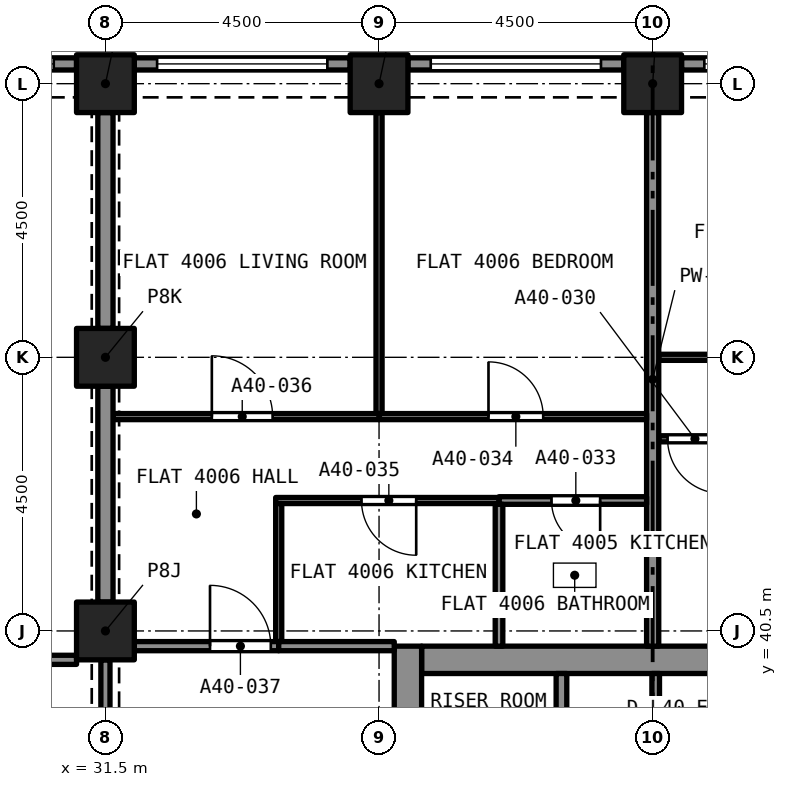
"""IFC4 building model, lengths in metres.
Left out: names, types, materials, properties, quantities, classifications, styles, units other than length and angle.
Written with IfcOpenShell. Run it as: python <this file> out.ifc"""

import sys

from ifc_helpers import new_model, si_unit, direction, frame, frame_2d, origin, origin_2d, place, context, subcontext, project, spatial, rectangle, extrude, element, fill, save


model = new_model("IFC4")
c1 = context("Model", 3, precision=1e-05, world=origin(), true_north=direction((0.0, 1.0)))
c2 = subcontext(c1, "Body", "Model", "MODEL_VIEW")
j1 = project(units=[si_unit("LENGTHUNIT", "METRE"), si_unit("PLANEANGLEUNIT", "RADIAN")], contexts=[c1])
p1 = place(None, origin())
s1 = spatial("IfcSite", under=j1, at=p1, CompositionType="ELEMENT")
p2 = place(p1, origin())
s2 = spatial("IfcBuilding", under=s1, at=p2, CompositionType="ELEMENT")
p3 = place(p2, frame((0.0, 0.0, 143.0)))
s3 = spatial("IfcBuildingStorey", under=s2, at=p3, CompositionType="ELEMENT", Elevation=143.0)
for number, where, z_axis, x_axis in (
    (1, (31.5, 40.5, 0.0), (0.0, 0.0, 1.0), (1.0, 0.0, 0.0)),
    (2, (31.5, 45.0, 0.0), (0.0, 0.0, 1.0), (1.0, 0.0, 0.0)),
    (3, (31.5, 49.5, 0.0), (0.0, 0.0, 1.0), (1.0, 0.0, 0.0)),
    (4, (36.0, 49.5, 0.0), (0.0, 0.0, 1.0), (1.0, 0.0, 0.0)),
    (5, (40.5, 49.5, 0.0), (0.0, 0.0, 1.0), (1.0, 0.0, 0.0)),
):
    element("IfcColumn", number, at=place(p3, frame(where, z_axis=z_axis, x_axis=x_axis)), inside=s3, PredefinedType="COLUMN", context=c2, shape_type="SweptSolid", body=[
        extrude(rectangle(XDim=0.95, YDim=0.95, at=origin_2d()), origin(), (0.0, 0.0, 1.0), 3.2),
    ])
p4 = place(p3, frame((36.7, 40.025, 0.0), z_axis=(0.0, 0.0, 1.0), x_axis=(1.0, 0.0, 0.0)))
e6 = element("IfcWall", 6, at=p4, inside=s3, PredefinedType="SOLIDWALL", context=c2, shape_type="SweptSolid", body=[
    extrude(rectangle(XDim=7.6, YDim=0.45, at=frame_2d((3.8, 0.0))), origin(), (0.0, 0.0, 1.0), 3.2),
])
p5 = place(p3, frame((36.475, 27.25, 0.0), z_axis=(0.0, 0.0, 1.0), x_axis=(0.0, 1.0, 0.0)))
e7 = element("IfcWall", 7, at=p5, inside=s3, PredefinedType="SOLIDWALL", context=c2, shape_type="SweptSolid", body=[
    extrude(rectangle(XDim=13.0, YDim=0.45, at=frame_2d((6.5, 0.0))), origin(), (0.0, 0.0, 1.0), 3.2),
])
p6 = place(p5, frame((8.7, 0.0, 0.0)))
e8 = element("IfcOpeningElement", 8, at=p6, cuts=e7, PredefinedType="OPENING", context=c2, shape_type="SweptSolid", body=[
    extrude(rectangle(XDim=1.2, YDim=2.1, at=frame_2d((0.6, 1.05))), frame((0.0, 0.235, 0.0), z_axis=(0.0, -1.0, 0.0), x_axis=(1.0, 0.0, 0.0)), (0.0, 0.0, 1.0), 0.47),
])
p7 = place(p3, frame((40.975, 49.825, 0.0), z_axis=(0.0, 0.0, 1.0), x_axis=(1.0, 0.0, 0.0)))
e9 = element("IfcWall", 9, at=p7, inside=s3, PredefinedType="SOLIDWALL", context=c2, shape_type="SweptSolid", body=[
    extrude(rectangle(XDim=3.55, YDim=0.2, at=frame_2d((1.775, 0.0))), origin(), (0.0, 0.0, 1.0), 3.2),
])
p8 = place(p7, frame((0.375, 0.0, 0.45)))
e10 = element("IfcOpeningElement", 10, at=p8, cuts=e9, PredefinedType="OPENING", context=c2, shape_type="SweptSolid", body=[
    extrude(rectangle(XDim=2.8, YDim=1.95, at=frame_2d((1.4, 0.975))), frame((0.0, 0.11, 0.0), z_axis=(0.0, -1.0, 0.0), x_axis=(1.0, 0.0, 0.0)), (0.0, 0.0, 1.0), 0.22),
])
p9 = place(p3, frame((36.475, 49.825, 0.0), z_axis=(0.0, 0.0, 1.0), x_axis=(1.0, 0.0, 0.0)))
e11 = element("IfcWall", 11, at=p9, inside=s3, PredefinedType="SOLIDWALL", context=c2, shape_type="SweptSolid", body=[
    extrude(rectangle(XDim=3.55, YDim=0.2, at=frame_2d((1.775, 0.0))), origin(), (0.0, 0.0, 1.0), 3.2),
])
p10 = place(p9, frame((0.375, 0.0, 0.45)))
e12 = element("IfcOpeningElement", 12, at=p10, cuts=e11, PredefinedType="OPENING", context=c2, shape_type="SweptSolid", body=[
    extrude(rectangle(XDim=2.8, YDim=1.95, at=frame_2d((1.4, 0.975))), frame((0.0, 0.11, 0.0), z_axis=(0.0, -1.0, 0.0), x_axis=(1.0, 0.0, 0.0)), (0.0, 0.0, 1.0), 0.22),
])
p11 = place(p3, frame((31.975, 49.825, 0.0), z_axis=(0.0, 0.0, 1.0), x_axis=(1.0, 0.0, 0.0)))
e13 = element("IfcWall", 13, at=p11, inside=s3, PredefinedType="SOLIDWALL", context=c2, shape_type="SweptSolid", body=[
    extrude(rectangle(XDim=3.55, YDim=0.2, at=frame_2d((1.775, 0.0))), origin(), (0.0, 0.0, 1.0), 3.2),
])
p12 = place(p11, frame((0.375, 0.0, 0.45)))
e14 = element("IfcOpeningElement", 14, at=p12, cuts=e13, PredefinedType="OPENING", context=c2, shape_type="SweptSolid", body=[
    extrude(rectangle(XDim=2.8, YDim=1.95, at=frame_2d((1.4, 0.975))), frame((0.0, 0.11, 0.0), z_axis=(0.0, -1.0, 0.0), x_axis=(1.0, 0.0, 0.0)), (0.0, 0.0, 1.0), 0.22),
])
p13 = place(p3, frame((27.475, 49.825, 0.0), z_axis=(0.0, 0.0, 1.0), x_axis=(1.0, 0.0, 0.0)))
e15 = element("IfcWall", 15, at=p13, inside=s3, PredefinedType="SOLIDWALL", context=c2, shape_type="SweptSolid", body=[
    extrude(rectangle(XDim=3.55, YDim=0.2, at=frame_2d((1.775, 0.0))), origin(), (0.0, 0.0, 1.0), 3.2),
])
p14 = place(p13, frame((0.375, 0.0, 0.45)))
e16 = element("IfcOpeningElement", 16, at=p14, cuts=e15, PredefinedType="OPENING", context=c2, shape_type="SweptSolid", body=[
    extrude(rectangle(XDim=2.8, YDim=1.95, at=frame_2d((1.4, 0.975))), frame((0.0, 0.11, 0.0), z_axis=(0.0, -1.0, 0.0), x_axis=(1.0, 0.0, 0.0)), (0.0, 0.0, 1.0), 0.22),
])
p15 = place(p3, frame((40.6, 45.0, 0.0), z_axis=(0.0, 0.0, 1.0), x_axis=(1.0, 0.0, 0.0)))
e17 = element("IfcWall", 17, at=p15, inside=s3, PredefinedType="PARTITIONING", context=c2, shape_type="SweptSolid", body=[
    extrude(rectangle(XDim=4.4, YDim=0.1, at=frame_2d((2.2, 0.0))), origin(), (0.0, 0.0, 1.0), 2.9),
])
p16 = place(p15, frame((1.7, 0.0, 0.0)))
e18 = element("IfcOpeningElement", 18, at=p16, cuts=e17, PredefinedType="OPENING", context=c2, shape_type="SweptSolid", body=[
    extrude(rectangle(XDim=0.9, YDim=2.1, at=frame_2d((0.45, 1.05))), frame((0.0, 0.06, 0.0), z_axis=(0.0, -1.0, 0.0), x_axis=(1.0, 0.0, 0.0)), (0.0, 0.0, 1.0), 0.12),
])
p17 = place(p3, frame((41.891, 43.66, 0.0), z_axis=(0.0, 0.0, 1.0), x_axis=(-1.0, 0.0, 0.0)))
e19 = element("IfcWall", 19, at=p17, inside=s3, PredefinedType="PARTITIONING", context=c2, shape_type="SweptSolid", body=[
    extrude(rectangle(XDim=1.291, YDim=0.1, at=frame_2d((0.646, 0.0))), origin(), (0.0, 0.0, 1.0), 2.9),
])
p18 = place(p17, frame((0.246, 0.0, 0.0)))
e20 = element("IfcOpeningElement", 20, at=p18, cuts=e19, PredefinedType="OPENING", context=c2, shape_type="SweptSolid", body=[
    extrude(rectangle(XDim=0.9, YDim=2.1, at=frame_2d((0.45, 1.05))), frame((0.0, 0.06, 0.0), z_axis=(0.0, -1.0, 0.0), x_axis=(1.0, 0.0, 0.0)), (0.0, 0.0, 1.0), 0.12),
])
p19 = place(p3, frame((40.5, 40.25, 0.0), z_axis=(0.0, 0.0, 1.0), x_axis=(0.0, 1.0, 0.0)))
e21 = element("IfcWall", 21, at=p19, inside=s3, PredefinedType="PARTITIONING", context=c2, shape_type="SweptSolid", body=[
    extrude(rectangle(XDim=8.775, YDim=0.2, at=frame_2d((4.387, 0.0))), origin(), (0.0, 0.0, 1.0), 2.9),
])
p20 = place(p3, frame((40.4, 42.645, 0.0), z_axis=(0.0, 0.0, 1.0), x_axis=(-1.0, 0.0, 0.0)))
e22 = element("IfcWall", 22, at=p20, inside=s3, PredefinedType="PARTITIONING", context=c2, shape_type="SweptSolid", body=[
    extrude(rectangle(XDim=2.427, YDim=0.125, at=frame_2d((1.214, 0.0))), origin(), (0.0, 0.0, 1.0), 2.9),
])
p21 = place(p20, frame((0.764, 0.0, 0.0)))
e23 = element("IfcOpeningElement", 23, at=p21, cuts=e22, PredefinedType="OPENING", context=c2, shape_type="SweptSolid", body=[
    extrude(rectangle(XDim=0.8, YDim=2.1, at=frame_2d((0.4, 1.05))), frame((0.0, 0.073, 0.0), z_axis=(0.0, -1.0, 0.0), x_axis=(1.0, 0.0, 0.0)), (0.0, 0.0, 1.0), 0.145),
])
p22 = place(p3, frame((37.973, 40.25, 0.0), z_axis=(0.0, 0.0, 1.0), x_axis=(0.0, 1.0, 0.0)))
e24 = element("IfcWall", 24, at=p22, inside=s3, PredefinedType="PARTITIONING", context=c2, shape_type="SweptSolid", body=[
    extrude(rectangle(XDim=2.333, YDim=0.125, at=frame_2d((1.166, 0.0))), origin(), (0.0, 0.0, 1.0), 2.9),
])
p23 = place(p3, frame((36.0, 44.025, 0.0), z_axis=(0.0, 0.0, 1.0), x_axis=(1.0, 0.0, 0.0)))
e25 = element("IfcWall", 25, at=p23, inside=s3, PredefinedType="PARTITIONING", context=c2, shape_type="SweptSolid", body=[
    extrude(rectangle(XDim=4.4, YDim=0.1, at=frame_2d((2.2, 0.0))), origin(), (0.0, 0.0, 1.0), 2.9),
])
p24 = place(p23, frame((1.8, 0.0, 0.0)))
e26 = element("IfcOpeningElement", 26, at=p24, cuts=e25, PredefinedType="OPENING", context=c2, shape_type="SweptSolid", body=[
    extrude(rectangle(XDim=0.9, YDim=2.1, at=frame_2d((0.45, 1.05))), frame((0.0, 0.06, 0.0), z_axis=(0.0, -1.0, 0.0), x_axis=(1.0, 0.0, 0.0)), (0.0, 0.0, 1.0), 0.12),
])
p25 = place(p3, frame((36.0, 44.075, 0.0), z_axis=(0.0, 0.0, 1.0), x_axis=(0.0, 1.0, 0.0)))
e27 = element("IfcWall", 27, at=p25, inside=s3, PredefinedType="PARTITIONING", context=c2, shape_type="SweptSolid", body=[
    extrude(rectangle(XDim=4.95, YDim=0.1, at=frame_2d((2.475, 0.0))), origin(), (0.0, 0.0, 1.0), 2.9),
])
p26 = place(p3, frame((37.973, 42.645, 0.0), z_axis=(0.0, 0.0, 1.0), x_axis=(-1.0, 0.0, 0.0)))
e28 = element("IfcWall", 28, at=p26, inside=s3, PredefinedType="PARTITIONING", context=c2, shape_type="SweptSolid", body=[
    extrude(rectangle(XDim=3.673, YDim=0.1, at=frame_2d((1.836, 0.0))), origin(), (0.0, 0.0, 1.0), 2.9),
])
p27 = place(p26, frame((1.361, 0.0, 0.0)))
e29 = element("IfcOpeningElement", 29, at=p27, cuts=e28, PredefinedType="OPENING", context=c2, shape_type="SweptSolid", body=[
    extrude(rectangle(XDim=0.9, YDim=2.1, at=frame_2d((0.45, 1.05))), frame((0.0, 0.06, 0.0), z_axis=(0.0, -1.0, 0.0), x_axis=(1.0, 0.0, 0.0)), (0.0, 0.0, 1.0), 0.12),
])
p28 = place(p3, frame((34.35, 40.325, 0.0), z_axis=(0.0, 0.0, 1.0), x_axis=(0.0, 1.0, 0.0)))
e30 = element("IfcWall", 30, at=p28, inside=s3, PredefinedType="PARTITIONING", context=c2, shape_type="SweptSolid", body=[
    extrude(rectangle(XDim=2.27, YDim=0.1, at=frame_2d((1.135, 0.0))), origin(), (0.0, 0.0, 1.0), 2.9),
])
p29 = place(p3, frame((31.625, 44.025, 0.0), z_axis=(0.0, 0.0, 1.0), x_axis=(1.0, 0.0, 0.0)))
e31 = element("IfcWall", 31, at=p29, inside=s3, PredefinedType="PARTITIONING", context=c2, shape_type="SweptSolid", body=[
    extrude(rectangle(XDim=4.375, YDim=0.1, at=frame_2d((2.188, 0.0))), origin(), (0.0, 0.0, 1.0), 2.9),
])
p30 = place(p29, frame((1.625, 0.0, 0.0)))
e32 = element("IfcOpeningElement", 32, at=p30, cuts=e31, PredefinedType="OPENING", context=c2, shape_type="SweptSolid", body=[
    extrude(rectangle(XDim=1.0, YDim=2.1, at=frame_2d((0.5, 1.05))), frame((0.0, 0.06, 0.0), z_axis=(0.0, -1.0, 0.0), x_axis=(1.0, 0.0, 0.0)), (0.0, 0.0, 1.0), 0.12),
])
p31 = place(p3, frame((31.5, 40.975, 0.0), z_axis=(0.0, 0.0, 1.0), x_axis=(0.0, 1.0, 0.0)))
e33 = element("IfcWall", 33, at=p31, inside=s3, PredefinedType="PARTITIONING", context=c2, shape_type="SweptSolid", body=[
    extrude(rectangle(XDim=3.55, YDim=0.25, at=frame_2d((1.775, 0.0))), origin(), (0.0, 0.0, 1.0), 2.38),
])
p32 = place(p3, frame((31.975, 40.25, 0.0), z_axis=(0.0, 0.0, 1.0), x_axis=(1.0, 0.0, 0.0)))
e34 = element("IfcWall", 34, at=p32, inside=s3, PredefinedType="PARTITIONING", context=c2, shape_type="SweptSolid", body=[
    extrude(rectangle(XDim=2.375, YDim=0.15, at=frame_2d((1.188, 0.0))), origin(), (0.0, 0.0, 1.0), 2.9),
])
p33 = place(p32, frame((1.245, 0.0, 0.0)))
e35 = element("IfcOpeningElement", 35, at=p33, cuts=e34, PredefinedType="OPENING", context=c2, shape_type="SweptSolid", body=[
    extrude(rectangle(XDim=1.0, YDim=2.1, at=frame_2d((0.5, 1.05))), frame((0.0, 0.085, 0.0), z_axis=(0.0, -1.0, 0.0), x_axis=(1.0, 0.0, 0.0)), (0.0, 0.0, 1.0), 0.17),
])
p34 = place(p3, frame((34.35, 40.25, 0.0), z_axis=(0.0, 0.0, 1.0), x_axis=(1.0, 0.0, 0.0)))
e36 = element("IfcWall", 36, at=p34, inside=s3, PredefinedType="PARTITIONING", context=c2, shape_type="SweptSolid", body=[
    extrude(rectangle(XDim=1.9, YDim=0.15, at=frame_2d((0.95, 0.0))), origin(), (0.0, 0.0, 1.0), 2.9),
])
p35 = place(p3, frame((31.5, 45.475, 0.0), z_axis=(0.0, 0.0, 1.0), x_axis=(0.0, 1.0, 0.0)))
e37 = element("IfcWall", 37, at=p35, inside=s3, PredefinedType="PARTITIONING", context=c2, shape_type="SweptSolid", body=[
    extrude(rectangle(XDim=3.55, YDim=0.25, at=frame_2d((1.775, 0.0))), origin(), (0.0, 0.0, 1.0), 2.38),
])
p36 = place(p3, frame((18.475, 40.025, 0.0), z_axis=(0.0, 0.0, 1.0), x_axis=(1.0, 0.0, 0.0)))
e38 = element("IfcWall", 38, at=p36, inside=s3, PredefinedType="PARTITIONING", context=c2, shape_type="SweptSolid", body=[
    extrude(rectangle(XDim=12.55, YDim=0.15, at=frame_2d((6.275, 0.0))), origin(), (0.0, 0.0, 1.0), 2.75),
])
p37 = place(p36, frame((5.775, 0.0, 0.0)))
e39 = element("IfcOpeningElement", 39, at=p37, cuts=e38, PredefinedType="OPENING", context=c2, shape_type="SweptSolid", body=[
    extrude(rectangle(XDim=1.0, YDim=2.1, at=frame_2d((0.5, 1.05))), frame((0.0, 0.085, 0.0), z_axis=(0.0, -1.0, 0.0), x_axis=(1.0, 0.0, 0.0)), (0.0, 0.0, 1.0), 0.17),
])
p38 = place(p3, frame((31.5, 36.475, 0.0), z_axis=(0.0, 0.0, 1.0), x_axis=(0.0, 1.0, 0.0)))
e40 = element("IfcWall", 40, at=p38, inside=s3, PredefinedType="PARTITIONING", context=c2, shape_type="SweptSolid", body=[
    extrude(rectangle(XDim=3.55, YDim=0.15, at=frame_2d((1.775, 0.0))), origin(), (0.0, 0.0, 1.0), 2.38),
])
p39 = place(p38, frame((1.175, 0.0, 0.0)))
e41 = element("IfcOpeningElement", 41, at=p39, cuts=e40, PredefinedType="OPENING", context=c2, shape_type="SweptSolid", body=[
    extrude(rectangle(XDim=1.2, YDim=2.1, at=frame_2d((0.6, 1.05))), frame((0.0, 0.085, 0.0), z_axis=(0.0, -1.0, 0.0), x_axis=(1.0, 0.0, 0.0)), (0.0, 0.0, 1.0), 0.17),
])
p40 = place(p3, frame((39.0, 37.5, 0.0), z_axis=(0.0, 0.0, 1.0), x_axis=(0.0, 1.0, 0.0)))
e42 = element("IfcWall", 42, at=p40, inside=s3, PredefinedType="SOLIDWALL", context=c2, shape_type="SweptSolid", body=[
    extrude(rectangle(XDim=2.3, YDim=0.175, at=frame_2d((1.15, 0.0))), origin(), (0.0, 0.0, 1.0), 2.9),
])
p41 = place(p3, frame((40.55, 37.5, 0.0), z_axis=(0.0, 0.0, 1.0), x_axis=(0.0, 1.0, 0.0)))
e43 = element("IfcWall", 43, at=p41, inside=s3, PredefinedType="PARTITIONING", context=c2, shape_type="SweptSolid", body=[
    extrude(rectangle(XDim=2.3, YDim=0.125, at=frame_2d((1.15, 0.0))), origin(), (0.0, 0.0, 1.0), 2.9),
])
p42 = place(p8, origin())
e44 = element("IfcWindow", 44, at=p42, inside=s3, PartitioningType="SINGLE_PANEL", PredefinedType="WINDOW", context=c2, shape_type="SweptSolid", body=[
    extrude(rectangle(XDim=2.8, YDim=1.95, at=frame_2d((1.4, 0.975))), frame((0.0, 0.03, 0.0), z_axis=(0.0, -1.0, 0.0), x_axis=(1.0, 0.0, 0.0)), (0.0, 0.0, 1.0), 0.06),
])
fill(e10, e44)
p43 = place(p10, origin())
e45 = element("IfcWindow", 45, at=p43, inside=s3, PartitioningType="SINGLE_PANEL", PredefinedType="WINDOW", context=c2, shape_type="SweptSolid", body=[
    extrude(rectangle(XDim=2.8, YDim=1.95, at=frame_2d((1.4, 0.975))), frame((0.0, 0.03, 0.0), z_axis=(0.0, -1.0, 0.0), x_axis=(1.0, 0.0, 0.0)), (0.0, 0.0, 1.0), 0.06),
])
fill(e12, e45)
p44 = place(p12, origin())
e46 = element("IfcWindow", 46, at=p44, inside=s3, PartitioningType="SINGLE_PANEL", PredefinedType="WINDOW", context=c2, shape_type="SweptSolid", body=[
    extrude(rectangle(XDim=2.8, YDim=1.95, at=frame_2d((1.4, 0.975))), frame((0.0, 0.03, 0.0), z_axis=(0.0, -1.0, 0.0), x_axis=(1.0, 0.0, 0.0)), (0.0, 0.0, 1.0), 0.06),
])
fill(e14, e46)
p45 = place(p14, origin())
e47 = element("IfcWindow", 47, at=p45, inside=s3, PartitioningType="SINGLE_PANEL", PredefinedType="WINDOW", context=c2, shape_type="SweptSolid", body=[
    extrude(rectangle(XDim=2.8, YDim=1.95, at=frame_2d((1.4, 0.975))), frame((0.0, 0.03, 0.0), z_axis=(0.0, -1.0, 0.0), x_axis=(1.0, 0.0, 0.0)), (0.0, 0.0, 1.0), 0.06),
])
fill(e16, e47)
p46 = place(p18, origin())
e48 = element("IfcDoor", 48, at=p46, inside=s3, OperationType="SINGLE_SWING_RIGHT", PredefinedType="DOOR", context=c2, shape_type="SweptSolid", body=[
    extrude(rectangle(XDim=0.9, YDim=2.1, at=frame_2d((0.45, 1.05))), frame((0.0, 0.025, 0.0), z_axis=(0.0, -1.0, 0.0), x_axis=(1.0, 0.0, 0.0)), (0.0, 0.0, 1.0), 0.05),
])
fill(e20, e48)
p47 = place(p21, origin())
e49 = element("IfcDoor", 49, at=p47, inside=s3, OperationType="SINGLE_SWING_LEFT", PredefinedType="DOOR", context=c2, shape_type="SweptSolid", body=[
    extrude(rectangle(XDim=0.8, YDim=2.1, at=frame_2d((0.4, 1.05))), frame((0.0, 0.025, 0.0), z_axis=(0.0, -1.0, 0.0), x_axis=(1.0, 0.0, 0.0)), (0.0, 0.0, 1.0), 0.05),
])
fill(e23, e49)
p48 = place(p24, origin())
e50 = element("IfcDoor", 50, at=p48, inside=s3, OperationType="SINGLE_SWING_RIGHT", PredefinedType="DOOR", context=c2, shape_type="SweptSolid", body=[
    extrude(rectangle(XDim=0.9, YDim=2.1, at=frame_2d((0.45, 1.05))), frame((0.0, 0.025, 0.0), z_axis=(0.0, -1.0, 0.0), x_axis=(1.0, 0.0, 0.0)), (0.0, 0.0, 1.0), 0.05),
])
fill(e26, e50)
p49 = place(p27, origin())
e51 = element("IfcDoor", 51, at=p49, inside=s3, OperationType="SINGLE_SWING_LEFT", PredefinedType="DOOR", context=c2, shape_type="SweptSolid", body=[
    extrude(rectangle(XDim=0.9, YDim=2.1, at=frame_2d((0.45, 1.05))), frame((0.0, 0.025, 0.0), z_axis=(0.0, -1.0, 0.0), x_axis=(1.0, 0.0, 0.0)), (0.0, 0.0, 1.0), 0.05),
])
fill(e29, e51)
p50 = place(p30, origin())
e52 = element("IfcDoor", 52, at=p50, inside=s3, OperationType="SINGLE_SWING_LEFT", PredefinedType="DOOR", context=c2, shape_type="SweptSolid", body=[
    extrude(rectangle(XDim=1.0, YDim=2.1, at=frame_2d((0.5, 1.05))), frame((0.0, 0.025, 0.0), z_axis=(0.0, -1.0, 0.0), x_axis=(1.0, 0.0, 0.0)), (0.0, 0.0, 1.0), 0.05),
])
fill(e32, e52)
p51 = place(p33, origin())
e53 = element("IfcDoor", 53, at=p51, inside=s3, OperationType="SINGLE_SWING_RIGHT", PredefinedType="DOOR", context=c2, shape_type="SweptSolid", body=[
    extrude(rectangle(XDim=1.0, YDim=2.1, at=frame_2d((0.5, 1.05))), frame((0.0, 0.025, 0.0), z_axis=(0.0, -1.0, 0.0), x_axis=(1.0, 0.0, 0.0)), (0.0, 0.0, 1.0), 0.05),
])
fill(e35, e53)
save(model, sys.argv[1])
